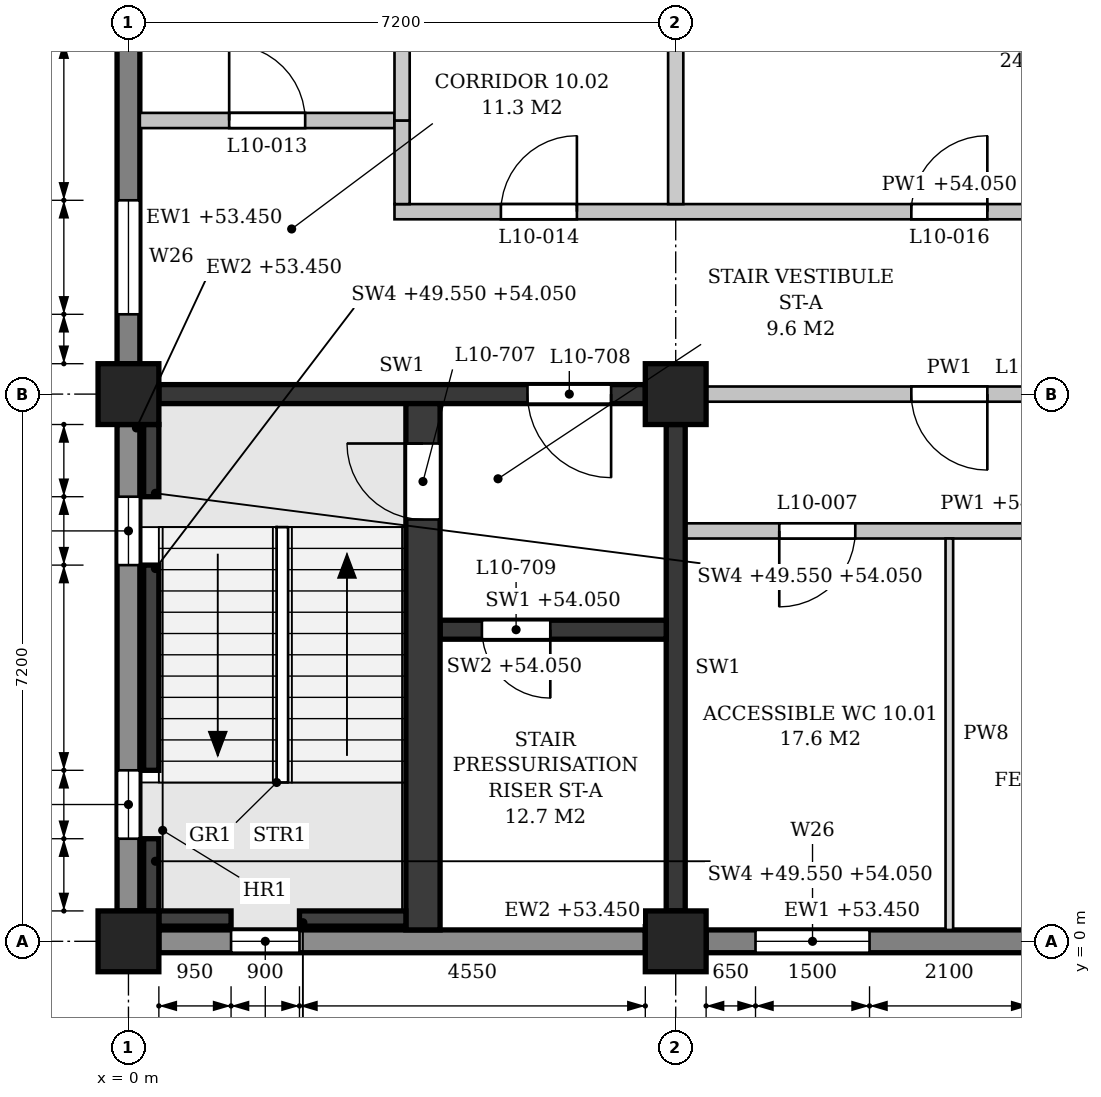
"""IFC4 building model, lengths in metres.
Left out: names, types, materials, properties, quantities, classifications, styles, units other than length and angle.
Written with IfcOpenShell. Run it as: python <this file> out.ifc"""

import sys

from ifc_helpers import new_model, si_unit, direction, frame, frame_2d, origin, origin_2d, place, context, subcontext, project, spatial, polyline, rectangle, outline, extrude, element, fill, save


model = new_model("IFC4")
c1 = context("Model", 3, precision=1e-05, world=origin(), true_north=direction((0.0, 1.0)))
c2 = subcontext(c1, "Body", "Model", "MODEL_VIEW")
j1 = project(units=[si_unit("LENGTHUNIT", "METRE"), si_unit("PLANEANGLEUNIT", "RADIAN")], contexts=[c1])
p1 = place(None, origin())
s1 = spatial("IfcSite", under=j1, at=p1, CompositionType="ELEMENT")
p2 = place(p1, origin())
s2 = spatial("IfcBuilding", under=s1, at=p2, CompositionType="ELEMENT")
p3 = place(p2, frame((0.0, 0.0, 49.8)))
s3 = spatial("IfcBuildingStorey", under=s2, at=p3, CompositionType="ELEMENT", Elevation=49.8)
for number, where, z_axis, x_axis in (
    (1, (0.0, 0.0, 0.0), (0.0, 0.0, 1.0), (1.0, 0.0, 0.0)),
    (2, (0.0, 7.2, 0.0), (0.0, 0.0, 1.0), (1.0, 0.0, 0.0)),
    (3, (7.2, 0.0, 0.0), (0.0, 0.0, 1.0), (1.0, 0.0, 0.0)),
    (4, (7.2, 7.2, 0.0), (0.0, 0.0, 1.0), (1.0, 0.0, 0.0)),
):
    element("IfcColumn", number, at=place(p3, frame(where, z_axis=z_axis, x_axis=x_axis)), inside=s3, PredefinedType="COLUMN", context=c2, shape_type="SweptSolid", body=[
        extrude(rectangle(XDim=0.8, YDim=0.8, at=origin_2d()), origin(), (0.0, 0.0, 1.0), 4.5),
    ])
p4 = place(p3, frame((0.0, 0.4, 0.0), z_axis=(0.0, 0.0, 1.0), x_axis=(0.0, 1.0, 0.0)))
e5 = element("IfcWall", 5, at=p4, inside=s3, PredefinedType="STANDARD", context=c2, shape_type="SweptSolid", body=[
    extrude(rectangle(XDim=6.4, YDim=0.3, at=frame_2d((3.2, 0.0))), origin(), (0.0, 0.0, 1.0), 3.65),
])
p5 = place(p4, frame((0.95, 0.0, 0.9)))
e6 = element("IfcOpeningElement", 6, at=p5, cuts=e5, PredefinedType="OPENING", context=c2, shape_type="SweptSolid", body=[
    extrude(outline(polyline([(0.0, 0.0), (0.9, 0.0), (0.9, 2.15), (0.45, 2.6), (0.0, 2.15), (0.0, 0.0)])), frame((0.0, 0.16, 0.0), z_axis=(0.0, -1.0, 0.0), x_axis=(1.0, 0.0, 0.0)), (0.0, 0.0, 1.0), 0.32),
])
p6 = place(p4, frame((4.55, 0.0, 0.9)))
e7 = element("IfcOpeningElement", 7, at=p6, cuts=e5, PredefinedType="OPENING", context=c2, shape_type="SweptSolid", body=[
    extrude(outline(polyline([(0.0, 0.0), (0.9, 0.0), (0.9, 2.15), (0.45, 2.6), (0.0, 2.15), (0.0, 0.0)])), frame((0.0, 0.16, 0.0), z_axis=(0.0, -1.0, 0.0), x_axis=(1.0, 0.0, 0.0)), (0.0, 0.0, 1.0), 0.32),
])
p7 = place(p3, frame((0.0, 7.6, 0.0), z_axis=(0.0, 0.0, 1.0), x_axis=(0.0, 1.0, 0.0)))
e8 = element("IfcWall", 8, at=p7, inside=s3, PredefinedType="STANDARD", context=c2, shape_type="SweptSolid", body=[
    extrude(rectangle(XDim=6.4, YDim=0.3, at=frame_2d((3.2, 0.0))), origin(), (0.0, 0.0, 1.0), 3.65),
])
p8 = place(p7, frame((0.65, 0.0, 0.9)))
e9 = element("IfcOpeningElement", 9, at=p8, cuts=e8, PredefinedType="OPENING", context=c2, shape_type="SweptSolid", body=[
    extrude(outline(polyline([(0.0, 0.0), (1.5, 0.0), (1.5, 1.85), (0.75, 2.6), (0.0, 1.85), (0.0, 0.0)])), frame((0.0, 0.16, 0.0), z_axis=(0.0, -1.0, 0.0), x_axis=(1.0, 0.0, 0.0)), (0.0, 0.0, 1.0), 0.32),
])
p9 = place(p7, frame((4.25, 0.0, 0.9)))
e10 = element("IfcOpeningElement", 10, at=p9, cuts=e8, PredefinedType="OPENING", context=c2, shape_type="SweptSolid", body=[
    extrude(outline(polyline([(0.0, 0.0), (1.5, 0.0), (1.5, 1.85), (0.75, 2.6), (0.0, 1.85), (0.0, 0.0)])), frame((0.0, 0.16, 0.0), z_axis=(0.0, -1.0, 0.0), x_axis=(1.0, 0.0, 0.0)), (0.0, 0.0, 1.0), 0.32),
])
p10 = place(p3, frame((0.4, 0.0, 0.0), z_axis=(0.0, 0.0, 1.0), x_axis=(1.0, 0.0, 0.0)))
e11 = element("IfcWall", 11, at=p10, inside=s3, PredefinedType="STANDARD", context=c2, shape_type="SweptSolid", body=[
    extrude(rectangle(XDim=6.4, YDim=0.3, at=frame_2d((3.2, 0.0))), origin(), (0.0, 0.0, 1.0), 3.65),
])
p11 = place(p10, frame((0.95, 0.0, 0.9)))
e12 = element("IfcOpeningElement", 12, at=p11, cuts=e11, PredefinedType="OPENING", context=c2, shape_type="SweptSolid", body=[
    extrude(outline(polyline([(0.0, 0.0), (0.9, 0.0), (0.9, 2.15), (0.45, 2.6), (0.0, 2.15), (0.0, 0.0)])), frame((0.0, 0.16, 0.0), z_axis=(0.0, -1.0, 0.0), x_axis=(1.0, 0.0, 0.0)), (0.0, 0.0, 1.0), 0.32),
])
p12 = place(p3, frame((7.6, 0.0, 0.0), z_axis=(0.0, 0.0, 1.0), x_axis=(1.0, 0.0, 0.0)))
e13 = element("IfcWall", 13, at=p12, inside=s3, PredefinedType="STANDARD", context=c2, shape_type="SweptSolid", body=[
    extrude(rectangle(XDim=6.4, YDim=0.3, at=frame_2d((3.2, 0.0))), origin(), (0.0, 0.0, 1.0), 3.65),
])
p13 = place(p12, frame((0.65, 0.0, 0.9)))
e14 = element("IfcOpeningElement", 14, at=p13, cuts=e13, PredefinedType="OPENING", context=c2, shape_type="SweptSolid", body=[
    extrude(outline(polyline([(0.0, 0.0), (1.5, 0.0), (1.5, 1.85), (0.75, 2.6), (0.0, 1.85), (0.0, 0.0)])), frame((0.0, 0.16, 0.0), z_axis=(0.0, -1.0, 0.0), x_axis=(1.0, 0.0, 0.0)), (0.0, 0.0, 1.0), 0.32),
])
p14 = place(p12, frame((4.25, 0.0, 0.9)))
e15 = element("IfcOpeningElement", 15, at=p14, cuts=e13, PredefinedType="OPENING", context=c2, shape_type="SweptSolid", body=[
    extrude(outline(polyline([(0.0, 0.0), (1.5, 0.0), (1.5, 1.85), (0.75, 2.6), (0.0, 1.85), (0.0, 0.0)])), frame((0.0, 0.16, 0.0), z_axis=(0.0, -1.0, 0.0), x_axis=(1.0, 0.0, 0.0)), (0.0, 0.0, 1.0), 0.32),
])
p15 = place(p3, frame((0.4, 7.2, 0.0), z_axis=(0.0, 0.0, 1.0), x_axis=(1.0, 0.0, 0.0)))
e16 = element("IfcWall", 16, at=p15, inside=s3, PredefinedType="SHEAR", context=c2, shape_type="SweptSolid", body=[
    extrude(rectangle(XDim=6.4, YDim=0.25, at=frame_2d((3.2, 0.0))), origin(), (0.0, 0.0, 1.0), 3.55),
])
p16 = place(p15, frame((4.85, 0.0, 0.0)))
e17 = element("IfcOpeningElement", 17, at=p16, cuts=e16, PredefinedType="OPENING", context=c2, shape_type="SweptSolid", body=[
    extrude(rectangle(XDim=1.1, YDim=2.1, at=frame_2d((0.55, 1.05))), frame((0.0, 0.135, 0.0), z_axis=(0.0, -1.0, 0.0), x_axis=(1.0, 0.0, 0.0)), (0.0, 0.0, 1.0), 0.27),
])
p17 = place(p3, frame((7.2, 0.4, 0.0), z_axis=(0.0, 0.0, 1.0), x_axis=(0.0, 1.0, 0.0)))
e18 = element("IfcWall", 18, at=p17, inside=s3, PredefinedType="SHEAR", context=c2, shape_type="SweptSolid", body=[
    extrude(rectangle(XDim=6.4, YDim=0.25, at=frame_2d((3.2, 0.0))), origin(), (0.0, 0.0, 1.0), 3.55),
])
p18 = place(p3, frame((0.3, 0.4, -0.25), z_axis=(0.0, 0.0, 1.0), x_axis=(0.0, 1.0, 0.0)))
e19 = element("IfcWall", 19, at=p18, inside=s3, PredefinedType="SHEAR", context=c2, shape_type="SweptSolid", body=[
    extrude(rectangle(XDim=0.95, YDim=0.2, at=frame_2d((0.475, 0.0))), origin(), (0.0, 0.0, 1.0), 4.5),
])
p19 = place(p3, frame((0.3, 2.25, -0.25), z_axis=(0.0, 0.0, 1.0), x_axis=(0.0, 1.0, 0.0)))
e20 = element("IfcWall", 20, at=p19, inside=s3, PredefinedType="SHEAR", context=c2, shape_type="SweptSolid", body=[
    extrude(rectangle(XDim=2.7, YDim=0.2, at=frame_2d((1.35, 0.0))), origin(), (0.0, 0.0, 1.0), 4.5),
])
p20 = place(p3, frame((0.3, 5.85, -0.25), z_axis=(0.0, 0.0, 1.0), x_axis=(0.0, 1.0, 0.0)))
e21 = element("IfcWall", 21, at=p20, inside=s3, PredefinedType="SHEAR", context=c2, shape_type="SweptSolid", body=[
    extrude(rectangle(XDim=0.95, YDim=0.2, at=frame_2d((0.475, 0.0))), origin(), (0.0, 0.0, 1.0), 4.5),
])
p21 = place(p3, frame((0.4, 0.3, -0.25), z_axis=(0.0, 0.0, 1.0), x_axis=(1.0, 0.0, 0.0)))
e22 = element("IfcWall", 22, at=p21, inside=s3, PredefinedType="SHEAR", context=c2, shape_type="SweptSolid", body=[
    extrude(rectangle(XDim=0.95, YDim=0.2, at=frame_2d((0.475, 0.0))), origin(), (0.0, 0.0, 1.0), 4.5),
])
p22 = place(p3, frame((2.25, 0.3, -0.25), z_axis=(0.0, 0.0, 1.0), x_axis=(1.0, 0.0, 0.0)))
e23 = element("IfcWall", 23, at=p22, inside=s3, PredefinedType="SHEAR", context=c2, shape_type="SweptSolid", body=[
    extrude(rectangle(XDim=1.4, YDim=0.2, at=frame_2d((0.7, 0.0))), origin(), (0.0, 0.0, 1.0), 4.5),
])
p23 = place(p3, frame((3.875, 0.15, 0.0), z_axis=(0.0, 0.0, 1.0), x_axis=(0.0, 1.0, 0.0)))
e24 = element("IfcWall", 24, at=p23, inside=s3, PredefinedType="SHEAR", context=c2, shape_type="SweptSolid", body=[
    extrude(rectangle(XDim=6.925, YDim=0.45, at=frame_2d((3.462, 0.0))), origin(), (0.0, 0.0, 1.0), 4.25),
])
p24 = place(p23, frame((5.4, 0.0, 0.0)))
e25 = element("IfcOpeningElement", 25, at=p24, cuts=e24, PredefinedType="OPENING", context=c2, shape_type="SweptSolid", body=[
    extrude(rectangle(XDim=1.0, YDim=2.1, at=frame_2d((0.5, 1.05))), frame((0.0, 0.235, 0.0), z_axis=(0.0, -1.0, 0.0), x_axis=(1.0, 0.0, 0.0)), (0.0, 0.0, 1.0), 0.47),
])
p25 = place(p3, frame((4.1, 4.1, 0.0), z_axis=(0.0, 0.0, 1.0), x_axis=(1.0, 0.0, 0.0)))
e26 = element("IfcWall", 26, at=p25, inside=s3, PredefinedType="SHEAR", context=c2, shape_type="SweptSolid", body=[
    extrude(rectangle(XDim=2.975, YDim=0.25, at=frame_2d((1.487, 0.0))), origin(), (0.0, 0.0, 1.0), 4.25),
])
p26 = place(p25, frame((0.55, 0.0, 0.0)))
e27 = element("IfcOpeningElement", 27, at=p26, cuts=e26, PredefinedType="OPENING", context=c2, shape_type="SweptSolid", body=[
    extrude(rectangle(XDim=0.9, YDim=2.1, at=frame_2d((0.45, 1.05))), frame((0.0, 0.135, 0.0), z_axis=(0.0, -1.0, 0.0), x_axis=(1.0, 0.0, 0.0)), (0.0, 0.0, 1.0), 0.27),
])
p27 = place(p3, frame((7.325, 5.4, 0.0), z_axis=(0.0, 0.0, 1.0), x_axis=(1.0, 0.0, 0.0)))
e28 = element("IfcWall", 28, at=p27, inside=s3, PredefinedType="PARTITIONING", context=c2, shape_type="SweptSolid", body=[
    extrude(outline(polyline([(0.0, 0.0), (14.15, 0.0), (14.15, 3.55), (14.05, 3.55), (14.05, 4.25), (7.3, 4.25), (7.3, 3.55), (6.85, 3.55), (6.85, 4.25), (0.1, 4.25), (0.1, 3.55), (0.0, 3.55), (0.0, 0.0)])), frame((0.0, 0.1, 0.0), z_axis=(0.0, -1.0, 0.0), x_axis=(1.0, 0.0, 0.0)), (0.0, 0.0, 1.0), 0.2),
])
p28 = place(p27, frame((1.238, 0.0, 0.0)))
e29 = element("IfcOpeningElement", 29, at=p28, cuts=e28, PredefinedType="OPENING", context=c2, shape_type="SweptSolid", body=[
    extrude(rectangle(XDim=1.0, YDim=2.1, at=frame_2d((0.5, 1.05))), frame((0.0, 0.11, 0.0), z_axis=(0.0, -1.0, 0.0), x_axis=(1.0, 0.0, 0.0)), (0.0, 0.0, 1.0), 0.22),
])
p29 = place(p27, frame((4.775, 0.0, 0.0)))
e30 = element("IfcOpeningElement", 30, at=p29, cuts=e28, PredefinedType="OPENING", context=c2, shape_type="SweptSolid", body=[
    extrude(rectangle(XDim=1.0, YDim=2.1, at=frame_2d((0.5, 1.05))), frame((0.0, 0.11, 0.0), z_axis=(0.0, -1.0, 0.0), x_axis=(1.0, 0.0, 0.0)), (0.0, 0.0, 1.0), 0.22),
])
p30 = place(p27, frame((8.375, 0.0, 0.0)))
e31 = element("IfcOpeningElement", 31, at=p30, cuts=e28, PredefinedType="OPENING", context=c2, shape_type="SweptSolid", body=[
    extrude(rectangle(XDim=1.0, YDim=2.1, at=frame_2d((0.5, 1.05))), frame((0.0, 0.11, 0.0), z_axis=(0.0, -1.0, 0.0), x_axis=(1.0, 0.0, 0.0)), (0.0, 0.0, 1.0), 0.22),
])
p31 = place(p27, frame((11.913, 0.0, 0.0)))
e32 = element("IfcOpeningElement", 32, at=p31, cuts=e28, PredefinedType="OPENING", context=c2, shape_type="SweptSolid", body=[
    extrude(rectangle(XDim=1.0, YDim=2.1, at=frame_2d((0.5, 1.05))), frame((0.0, 0.11, 0.0), z_axis=(0.0, -1.0, 0.0), x_axis=(1.0, 0.0, 0.0)), (0.0, 0.0, 1.0), 0.22),
])
p32 = place(p3, frame((7.6, 7.2, 0.0), z_axis=(0.0, 0.0, 1.0), x_axis=(1.0, 0.0, 0.0)))
e33 = element("IfcWall", 33, at=p32, inside=s3, PredefinedType="PARTITIONING", context=c2, shape_type="SweptSolid", body=[
    extrude(rectangle(XDim=6.4, YDim=0.2, at=frame_2d((3.2, 0.0))), origin(), (0.0, 0.0, 1.0), 3.55),
])
p33 = place(p32, frame((2.7, 0.0, 0.0)))
e34 = element("IfcOpeningElement", 34, at=p33, cuts=e33, PredefinedType="OPENING", context=c2, shape_type="SweptSolid", body=[
    extrude(rectangle(XDim=1.0, YDim=2.1, at=frame_2d((0.5, 1.05))), frame((0.0, 0.11, 0.0), z_axis=(0.0, -1.0, 0.0), x_axis=(1.0, 0.0, 0.0)), (0.0, 0.0, 1.0), 0.22),
])
p34 = place(p3, frame((3.5, 9.6, 0.0), z_axis=(0.0, 0.0, 1.0), x_axis=(1.0, 0.0, 0.0)))
e35 = element("IfcWall", 35, at=p34, inside=s3, PredefinedType="PARTITIONING", context=c2, shape_type="SweptSolid", body=[
    extrude(outline(polyline([(0.0, 0.0), (14.6, 0.0), (14.6, 4.25), (11.125, 4.25), (11.125, 3.55), (10.675, 3.55), (10.675, 4.25), (3.925, 4.25), (3.925, 3.55), (3.475, 3.55), (3.475, 4.25), (0.0, 4.25), (0.0, 0.0)])), frame((0.0, 0.1, 0.0), z_axis=(0.0, -1.0, 0.0), x_axis=(1.0, 0.0, 0.0)), (0.0, 0.0, 1.0), 0.2),
])
p35 = place(p34, frame((1.4, 0.0, 0.0)))
e36 = element("IfcOpeningElement", 36, at=p35, cuts=e35, PredefinedType="OPENING", context=c2, shape_type="SweptSolid", body=[
    extrude(rectangle(XDim=1.0, YDim=2.1, at=frame_2d((0.5, 1.05))), frame((0.0, 0.11, 0.0), z_axis=(0.0, -1.0, 0.0), x_axis=(1.0, 0.0, 0.0)), (0.0, 0.0, 1.0), 0.22),
])
p36 = place(p34, frame((6.8, 0.0, 0.0)))
e37 = element("IfcOpeningElement", 37, at=p36, cuts=e35, PredefinedType="OPENING", context=c2, shape_type="SweptSolid", body=[
    extrude(rectangle(XDim=1.0, YDim=2.1, at=frame_2d((0.5, 1.05))), frame((0.0, 0.11, 0.0), z_axis=(0.0, -1.0, 0.0), x_axis=(1.0, 0.0, 0.0)), (0.0, 0.0, 1.0), 0.22),
])
p37 = place(p3, frame((0.15, 10.8, 0.0), z_axis=(0.0, 0.0, 1.0), x_axis=(1.0, 0.0, 0.0)))
e38 = element("IfcWall", 38, at=p37, inside=s3, PredefinedType="PARTITIONING", context=c2, shape_type="SweptSolid", body=[
    extrude(outline(polyline([(0.0, 0.0), (3.35, 0.0), (3.35, 4.25), (0.05, 4.25), (0.05, 3.65), (0.0, 3.65), (0.0, 0.0)])), frame((0.0, 0.1, 0.0), z_axis=(0.0, -1.0, 0.0), x_axis=(1.0, 0.0, 0.0)), (0.0, 0.0, 1.0), 0.2),
])
p38 = place(p37, frame((1.175, 0.0, 0.0)))
e39 = element("IfcOpeningElement", 39, at=p38, cuts=e38, PredefinedType="OPENING", context=c2, shape_type="SweptSolid", body=[
    extrude(rectangle(XDim=1.0, YDim=2.1, at=frame_2d((0.5, 1.05))), frame((0.0, 0.11, 0.0), z_axis=(0.0, -1.0, 0.0), x_axis=(1.0, 0.0, 0.0)), (0.0, 0.0, 1.0), 0.22),
])
p39 = place(p3, frame((3.6, 9.7, 0.0), z_axis=(0.0, 0.0, 1.0), x_axis=(0.0, 1.0, 0.0)))
e40 = element("IfcWall", 40, at=p39, inside=s3, PredefinedType="PARTITIONING", context=c2, shape_type="SweptSolid", body=[
    extrude(rectangle(XDim=1.1, YDim=0.2, at=frame_2d((0.55, 0.0))), origin(), (0.0, 0.0, 1.0), 4.25),
])
p40 = place(p3, frame((3.6, 10.8, 0.0), z_axis=(0.0, 0.0, 1.0), x_axis=(0.0, 1.0, 0.0)))
e41 = element("IfcWall", 41, at=p40, inside=s3, PredefinedType="PARTITIONING", context=c2, shape_type="SweptSolid", body=[
    extrude(outline(polyline([(0.0, 0.0), (10.65, 0.0), (10.6, 4.25), (3.8, 4.25), (3.8, 3.65), (3.4, 3.65), (3.4, 4.25), (0.0, 4.25), (0.0, 0.0)])), frame((0.0, 0.1, 0.0), z_axis=(0.0, -1.0, 0.0), x_axis=(1.0, 0.0, 0.0)), (0.0, 0.0, 1.0), 0.2),
])
p41 = place(p3, frame((7.2, 9.7, 0.0), z_axis=(0.0, 0.0, 1.0), x_axis=(0.0, 1.0, 0.0)))
e42 = element("IfcWall", 42, at=p41, inside=s3, PredefinedType="PARTITIONING", context=c2, shape_type="SweptSolid", body=[
    extrude(rectangle(XDim=4.3, YDim=0.2, at=frame_2d((2.15, 0.0))), origin(), (0.0, 0.0, 1.0), 3.55),
])
p42 = place(p3, frame((10.8, 0.15, 0.0), z_axis=(0.0, 0.0, 1.0), x_axis=(0.0, 1.0, 0.0)))
e43 = element("IfcWall", 43, at=p42, inside=s3, PredefinedType="PARTITIONING", context=c2, shape_type="SweptSolid", body=[
    extrude(rectangle(XDim=5.15, YDim=0.1, at=frame_2d((2.575, 0.0))), origin(), (0.0, 0.0, 1.0), 3.55),
])
p43 = place(p11, origin())
e44 = element("IfcWindow", 44, at=p43, inside=s3, PartitioningType="SINGLE_PANEL", PredefinedType="WINDOW", context=c2, shape_type="SweptSolid", body=[
    extrude(outline(polyline([(0.0, 0.0), (0.9, 0.0), (0.9, 2.15), (0.45, 2.6), (0.0, 2.15), (0.0, 0.0)])), frame((0.0, 0.03, 0.0), z_axis=(0.0, -1.0, 0.0), x_axis=(1.0, 0.0, 0.0)), (0.0, 0.0, 1.0), 0.06),
])
fill(e12, e44)
p44 = place(p13, origin())
e45 = element("IfcWindow", 45, at=p44, inside=s3, PartitioningType="SINGLE_PANEL", PredefinedType="WINDOW", context=c2, shape_type="SweptSolid", body=[
    extrude(outline(polyline([(0.0, 0.0), (1.5, 0.0), (1.5, 1.85), (0.75, 2.6), (0.0, 1.85), (0.0, 0.0)])), frame((0.0, 0.03, 0.0), z_axis=(0.0, -1.0, 0.0), x_axis=(1.0, 0.0, 0.0)), (0.0, 0.0, 1.0), 0.06),
])
fill(e14, e45)
p45 = place(p5, origin())
e46 = element("IfcWindow", 46, at=p45, inside=s3, PartitioningType="SINGLE_PANEL", PredefinedType="WINDOW", context=c2, shape_type="SweptSolid", body=[
    extrude(outline(polyline([(0.0, 0.0), (0.9, 0.0), (0.9, 2.15), (0.45, 2.6), (0.0, 2.15), (0.0, 0.0)])), frame((0.0, 0.03, 0.0), z_axis=(0.0, -1.0, 0.0), x_axis=(1.0, 0.0, 0.0)), (0.0, 0.0, 1.0), 0.06),
])
fill(e6, e46)
p46 = place(p6, origin())
e47 = element("IfcWindow", 47, at=p46, inside=s3, PartitioningType="SINGLE_PANEL", PredefinedType="WINDOW", context=c2, shape_type="SweptSolid", body=[
    extrude(outline(polyline([(0.0, 0.0), (0.9, 0.0), (0.9, 2.15), (0.45, 2.6), (0.0, 2.15), (0.0, 0.0)])), frame((0.0, 0.03, 0.0), z_axis=(0.0, -1.0, 0.0), x_axis=(1.0, 0.0, 0.0)), (0.0, 0.0, 1.0), 0.06),
])
fill(e7, e47)
p47 = place(p8, origin())
e48 = element("IfcWindow", 48, at=p47, inside=s3, PartitioningType="SINGLE_PANEL", PredefinedType="WINDOW", context=c2, shape_type="SweptSolid", body=[
    extrude(outline(polyline([(0.0, 0.0), (1.5, 0.0), (1.5, 1.85), (0.75, 2.6), (0.0, 1.85), (0.0, 0.0)])), frame((0.0, 0.03, 0.0), z_axis=(0.0, -1.0, 0.0), x_axis=(1.0, 0.0, 0.0)), (0.0, 0.0, 1.0), 0.06),
])
fill(e9, e48)
p48 = place(p24, origin())
e49 = element("IfcDoor", 49, at=p48, inside=s3, OperationType="SINGLE_SWING_RIGHT", PredefinedType="DOOR", context=c2, shape_type="SweptSolid", body=[
    extrude(rectangle(XDim=1.0, YDim=2.1, at=frame_2d((0.5, 1.05))), frame((0.0, 0.025, 0.0), z_axis=(0.0, -1.0, 0.0), x_axis=(1.0, 0.0, 0.0)), (0.0, 0.0, 1.0), 0.05),
])
fill(e25, e49)
p49 = place(p16, frame((1.1, 0.0, 0.0), z_axis=(0.0, 0.0, 1.0), x_axis=(-1.0, 0.0, 0.0)))
e50 = element("IfcDoor", 50, at=p49, inside=s3, OperationType="SINGLE_SWING_LEFT", PredefinedType="DOOR", context=c2, shape_type="SweptSolid", body=[
    extrude(rectangle(XDim=1.1, YDim=2.1, at=frame_2d((0.55, 1.05))), frame((0.0, 0.025, 0.0), z_axis=(0.0, -1.0, 0.0), x_axis=(1.0, 0.0, 0.0)), (0.0, 0.0, 1.0), 0.05),
])
fill(e17, e50)
p50 = place(p26, frame((0.9, 0.0, 0.0), z_axis=(0.0, 0.0, 1.0), x_axis=(-1.0, 0.0, 0.0)))
e51 = element("IfcDoor", 51, at=p50, inside=s3, OperationType="SINGLE_SWING_LEFT", PredefinedType="DOOR", context=c2, shape_type="SweptSolid", body=[
    extrude(rectangle(XDim=0.9, YDim=2.1, at=frame_2d((0.45, 1.05))), frame((0.0, 0.025, 0.0), z_axis=(0.0, -1.0, 0.0), x_axis=(1.0, 0.0, 0.0)), (0.0, 0.0, 1.0), 0.05),
])
fill(e27, e51)
p51 = place(p33, frame((1.0, 0.0, 0.0), z_axis=(0.0, 0.0, 1.0), x_axis=(-1.0, 0.0, 0.0)))
e52 = element("IfcDoor", 52, at=p51, inside=s3, OperationType="SINGLE_SWING_LEFT", PredefinedType="DOOR", context=c2, shape_type="SweptSolid", body=[
    extrude(rectangle(XDim=1.0, YDim=2.1, at=frame_2d((0.5, 1.05))), frame((0.0, 0.025, 0.0), z_axis=(0.0, -1.0, 0.0), x_axis=(1.0, 0.0, 0.0)), (0.0, 0.0, 1.0), 0.05),
])
fill(e34, e52)
p52 = place(p28, frame((1.0, 0.0, 0.0), z_axis=(0.0, 0.0, 1.0), x_axis=(-1.0, 0.0, 0.0)))
e53 = element("IfcDoor", 53, at=p52, inside=s3, OperationType="SINGLE_SWING_RIGHT", PredefinedType="DOOR", context=c2, shape_type="SweptSolid", body=[
    extrude(rectangle(XDim=1.0, YDim=2.1, at=frame_2d((0.5, 1.05))), frame((0.0, 0.025, 0.0), z_axis=(0.0, -1.0, 0.0), x_axis=(1.0, 0.0, 0.0)), (0.0, 0.0, 1.0), 0.05),
])
fill(e29, e53)
p53 = place(p38, origin())
e54 = element("IfcDoor", 54, at=p53, inside=s3, OperationType="SINGLE_SWING_LEFT", PredefinedType="DOOR", context=c2, shape_type="SweptSolid", body=[
    extrude(rectangle(XDim=1.0, YDim=2.1, at=frame_2d((0.5, 1.05))), frame((0.0, 0.025, 0.0), z_axis=(0.0, -1.0, 0.0), x_axis=(1.0, 0.0, 0.0)), (0.0, 0.0, 1.0), 0.05),
])
fill(e39, e54)
p54 = place(p35, origin())
e55 = element("IfcDoor", 55, at=p54, inside=s3, OperationType="SINGLE_SWING_RIGHT", PredefinedType="DOOR", context=c2, shape_type="SweptSolid", body=[
    extrude(rectangle(XDim=1.0, YDim=2.1, at=frame_2d((0.5, 1.05))), frame((0.0, 0.025, 0.0), z_axis=(0.0, -1.0, 0.0), x_axis=(1.0, 0.0, 0.0)), (0.0, 0.0, 1.0), 0.05),
])
fill(e36, e55)
p55 = place(p36, origin())
e56 = element("IfcDoor", 56, at=p55, inside=s3, OperationType="SINGLE_SWING_RIGHT", PredefinedType="DOOR", context=c2, shape_type="SweptSolid", body=[
    extrude(rectangle(XDim=1.0, YDim=2.1, at=frame_2d((0.5, 1.05))), frame((0.0, 0.025, 0.0), z_axis=(0.0, -1.0, 0.0), x_axis=(1.0, 0.0, 0.0)), (0.0, 0.0, 1.0), 0.05),
])
fill(e37, e56)
save(model, sys.argv[1])
